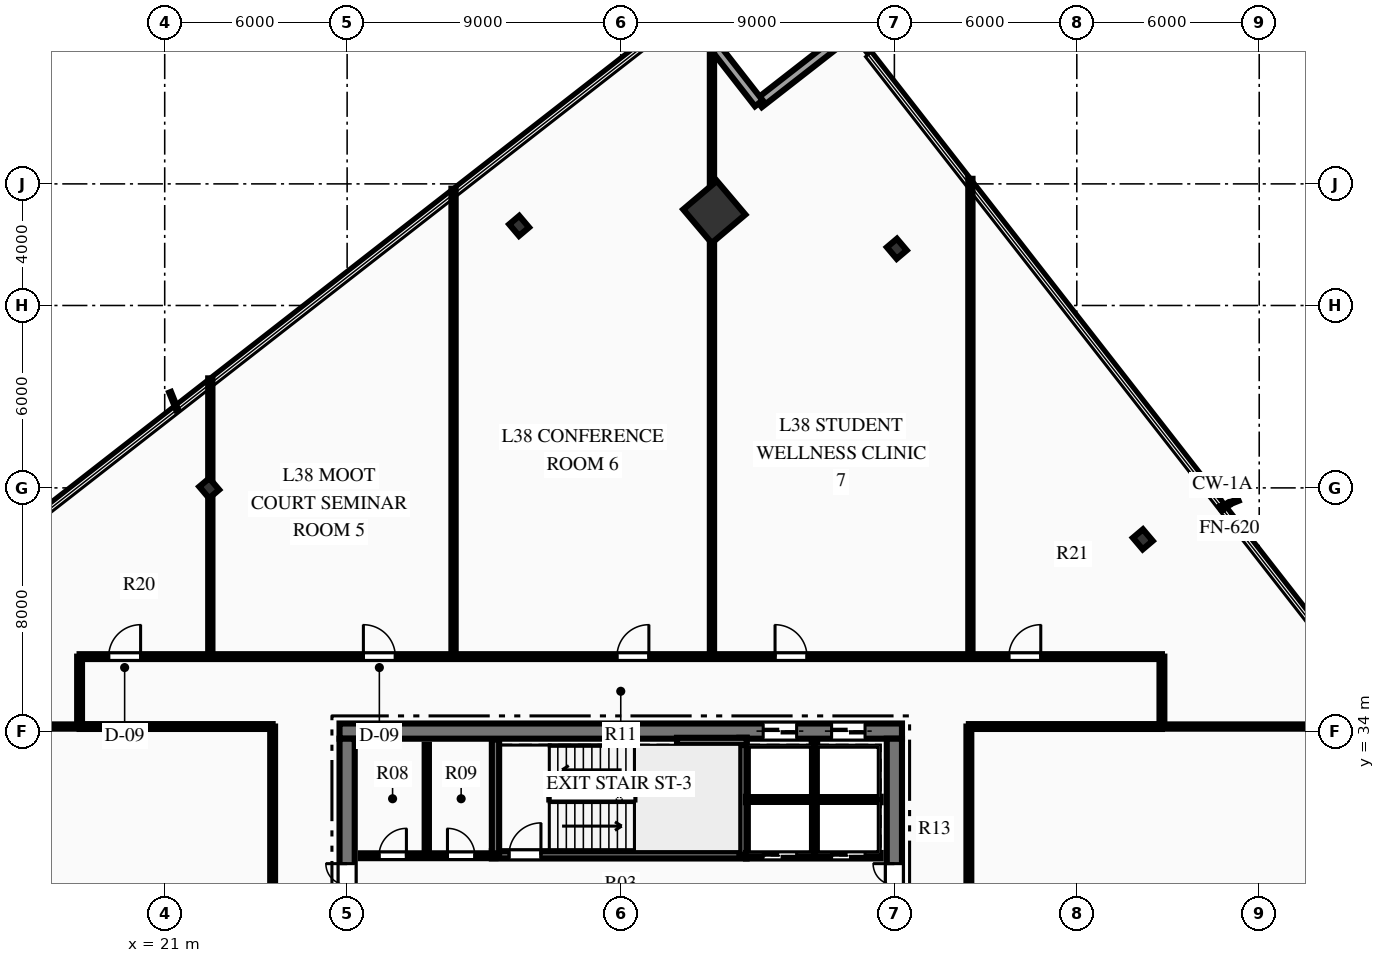
"""IFC4 building model, lengths in metres.
Left out: names, types, materials, properties, quantities, classifications, styles, units other than length and angle.
Written with IfcOpenShell. Run it as: python <this file> out.ifc"""

import sys

from ifc_helpers import new_model, si_unit, direction, frame, frame_2d, origin, origin_2d, place, context, subcontext, project, spatial, rectangle, hollow_rectangle, i_section, extrude, element, fill, save


model = new_model("IFC4")
c1 = context("Model", 3, precision=1e-05, world=origin(), true_north=direction((0.0, 1.0)))
c2 = subcontext(c1, "Body", "Model", "MODEL_VIEW")
j1 = project(units=[si_unit("LENGTHUNIT", "METRE"), si_unit("PLANEANGLEUNIT", "RADIAN")], contexts=[c1])
p1 = place(None, origin())
s1 = spatial("IfcSite", under=j1, at=p1, CompositionType="ELEMENT")
p2 = place(p1, origin())
s2 = spatial("IfcBuilding", under=s1, at=p2, CompositionType="ELEMENT")
p3 = place(p2, frame((0.0, 0.0, 155.7)))
s3 = spatial("IfcBuildingStorey", under=s2, at=p3, CompositionType="ELEMENT", Elevation=155.7)
p4 = place(p3, frame((26.75, 34.0, 0.0), z_axis=(0.0, 0.0, 1.0), x_axis=(1.0, 0.0, 0.0)))
e1 = element("IfcWall", 1, at=p4, inside=s3, PredefinedType="SHEAR", context=c2, shape_type="SweptSolid", body=[
    extrude(rectangle(XDim=18.5, YDim=0.5, at=frame_2d((9.25, 0.0))), origin(), (0.0, 0.0, 1.0), 3.75),
])
p5 = place(p4, frame((13.935, 0.0, 0.0)))
e2 = element("IfcOpeningElement", 2, at=p5, cuts=e1, PredefinedType="OPENING", context=c2, shape_type="SweptSolid", body=[
    extrude(rectangle(XDim=1.1, YDim=2.15, at=frame_2d((0.55, 1.075))), frame((0.0, 0.26, 0.0), z_axis=(0.0, -1.0, 0.0), x_axis=(1.0, 0.0, 0.0)), (0.0, 0.0, 1.0), 0.52),
])
p6 = place(p4, frame((16.185, 0.0, 0.0)))
e3 = element("IfcOpeningElement", 3, at=p6, cuts=e1, PredefinedType="OPENING", context=c2, shape_type="SweptSolid", body=[
    extrude(rectangle(XDim=1.1, YDim=2.15, at=frame_2d((0.55, 1.075))), frame((0.0, 0.26, 0.0), z_axis=(0.0, -1.0, 0.0), x_axis=(1.0, 0.0, 0.0)), (0.0, 0.0, 1.0), 0.52),
])
p7 = place(p3, frame((27.0, 18.25, 0.0), z_axis=(0.0, 0.0, 1.0), x_axis=(0.0, 1.0, 0.0)))
e4 = element("IfcWall", 4, at=p7, inside=s3, PredefinedType="SHEAR", context=c2, shape_type="SweptSolid", body=[
    extrude(rectangle(XDim=15.5, YDim=0.5, at=frame_2d((7.75, 0.0))), origin(), (0.0, 0.0, 1.0), 3.75),
])
p8 = place(p7, frame((9.99, 0.0, 0.0)))
e5 = element("IfcOpeningElement", 5, at=p8, cuts=e4, PredefinedType="OPENING", context=c2, shape_type="SweptSolid", body=[
    extrude(rectangle(XDim=1.4, YDim=2.2, at=frame_2d((0.7, 1.1))), frame((0.0, 0.26, 0.0), z_axis=(0.0, -1.0, 0.0), x_axis=(1.0, 0.0, 0.0)), (0.0, 0.0, 1.0), 0.52),
])
p9 = place(p3, frame((45.0, 18.25, 0.0), z_axis=(0.0, 0.0, 1.0), x_axis=(0.0, 1.0, 0.0)))
e6 = element("IfcWall", 6, at=p9, inside=s3, PredefinedType="SHEAR", context=c2, shape_type="SweptSolid", body=[
    extrude(rectangle(XDim=15.5, YDim=0.5, at=frame_2d((7.75, 0.0))), origin(), (0.0, 0.0, 1.0), 3.75),
])
p10 = place(p9, frame((9.99, 0.0, 0.0)))
e7 = element("IfcOpeningElement", 7, at=p10, cuts=e6, PredefinedType="OPENING", context=c2, shape_type="SweptSolid", body=[
    extrude(rectangle(XDim=1.4, YDim=2.2, at=frame_2d((0.7, 1.1))), frame((0.0, 0.26, 0.0), z_axis=(0.0, -1.0, 0.0), x_axis=(1.0, 0.0, 0.0)), (0.0, 0.0, 1.0), 0.52),
])
p11 = place(p3, frame((31.76, 29.93, 0.0), z_axis=(0.0, 0.0, 1.0), x_axis=(1.0, 0.0, 0.0)))
e8 = element("IfcWall", 8, at=p11, inside=s3, PredefinedType="SHEAR", context=c2, shape_type="SweptSolid", body=[
    extrude(rectangle(XDim=8.38, YDim=0.24, at=frame_2d((4.19, 0.0))), origin(), (0.0, 0.0, 1.0), 3.75),
])
p12 = place(p11, frame((0.565, 0.0, 0.0)))
e9 = element("IfcOpeningElement", 9, at=p12, cuts=e8, PredefinedType="OPENING", context=c2, shape_type="SweptSolid", body=[
    extrude(rectangle(XDim=1.05, YDim=2.15, at=frame_2d((0.525, 1.075))), frame((0.0, 0.13, 0.0), z_axis=(0.0, -1.0, 0.0), x_axis=(1.0, 0.0, 0.0)), (0.0, 0.0, 1.0), 0.26),
])
p13 = place(p3, frame((31.88, 29.93, 0.0), z_axis=(0.0, 0.0, 1.0), x_axis=(0.0, 1.0, 0.0)))
e10 = element("IfcWall", 10, at=p13, inside=s3, PredefinedType="SHEAR", context=c2, shape_type="SweptSolid", body=[
    extrude(rectangle(XDim=3.79, YDim=0.24, at=frame_2d((1.895, 0.0))), origin(), (0.0, 0.0, 1.0), 3.75),
])
p14 = place(p3, frame((40.02, 29.93, 0.0), z_axis=(0.0, 0.0, 1.0), x_axis=(0.0, 1.0, 0.0)))
e11 = element("IfcWall", 11, at=p14, inside=s3, PredefinedType="SHEAR", context=c2, shape_type="SweptSolid", body=[
    extrude(rectangle(XDim=3.85, YDim=0.24, at=frame_2d((1.925, 0.0))), origin(), (0.0, 0.0, 1.0), 3.75),
])
p15 = place(p3, frame((37.85, 33.66, 0.0), z_axis=(0.0, 0.0, 1.0), x_axis=(1.0, 0.0, 0.0)))
e12 = element("IfcWall", 12, at=p15, inside=s3, PredefinedType="SHEAR", context=c2, shape_type="SweptSolid", body=[
    extrude(rectangle(XDim=2.29, YDim=0.24, at=frame_2d((1.145, 0.0))), origin(), (0.0, 0.0, 1.0), 3.75),
])
p16 = place(p3, frame((39.077, 51.075, 0.0), z_axis=(0.0, 0.0, 1.0), x_axis=(0.763232469783, 0.646123979643, 0.0)))
e13 = element("IfcColumn", 13, at=p16, inside=s3, PredefinedType="COLUMN", context=c2, shape_type="SweptSolid", body=[
    extrude(hollow_rectangle(XDim=1.45, YDim=1.45, WallThickness=0.07, at=origin_2d()), origin(), (0.0, 0.0, 1.0), 3.75),
])
for number, where, z_axis, x_axis in (
    (14, (53.171, 40.307, 0.0), (0.0, 0.0, 1.0), (0.763, 0.646, 0.0)),
    (15, (45.08, 49.865, 0.0), (0.0, 0.0, 1.0), (0.763, 0.646, 0.0)),
    (16, (32.657, 50.619, 0.0), (0.0, 0.0, 1.0), (0.763, 0.646, 0.0)),
    (17, (22.464, 41.99, 0.0), (0.0, 0.0, 1.0), (0.763, 0.646, 0.0)),
):
    element("IfcColumn", number, at=place(p3, frame(where, z_axis=z_axis, x_axis=x_axis)), inside=s3, PredefinedType="COLUMN", context=c2, shape_type="SweptSolid", body=[
        extrude(i_section(OverallWidth=0.432, OverallDepth=0.498, WebThickness=0.056, FlangeThickness=0.089, at=origin_2d()), origin(), (0.0, 0.0, 1.0), 3.75),
    ])
p17 = place(p3, frame((43.695, 57.111, 0.0), z_axis=(0.0, 0.0, 1.0), x_axis=(0.614954214778, -0.788562815333, 0.0)))
e18 = element("IfcWall", 18, at=p17, inside=s3, PredefinedType="STANDARD", context=c2, shape_type="SweptSolid", body=[
    extrude(rectangle(XDim=0.9, YDim=0.32, at=frame_2d((0.45, 0.0))), origin(), (0.0, 0.0, 1.0), 3.46),
])
p18 = place(p3, frame((40.541, 54.651, 0.0), z_axis=(0.0, 0.0, 1.0), x_axis=(0.788526577195, 0.615000680534, 0.0)))
e19 = element("IfcWall", 19, at=p18, inside=s3, PredefinedType="STANDARD", context=c2, shape_type="SweptSolid", body=[
    extrude(rectangle(XDim=4.0, YDim=0.32, at=frame_2d((2.0, 0.0))), origin(), (0.0, 0.0, 1.0), 3.46),
])
p19 = place(p3, frame((38.081, 57.805, 0.0), z_axis=(0.0, 0.0, 1.0), x_axis=(0.614971082366, -0.788549660994, 0.0)))
e20 = element("IfcWall", 20, at=p19, inside=s3, PredefinedType="STANDARD", context=c2, shape_type="SweptSolid", body=[
    extrude(rectangle(XDim=4.0, YDim=0.32, at=frame_2d((2.0, 0.0))), origin(), (0.0, 0.0, 1.0), 3.46),
])
p20 = place(p3, frame((27.45, 29.9, 0.0), z_axis=(0.0, 0.0, 1.0), x_axis=(1.0, 0.0, 0.0)))
e21 = element("IfcWall", 21, at=p20, inside=s3, PredefinedType="PARTITIONING", context=c2, shape_type="SweptSolid", body=[
    extrude(rectangle(XDim=4.43, YDim=0.16, at=frame_2d((2.215, 0.0))), origin(), (0.0, 0.0, 1.0), 3.46),
])
p21 = place(p20, frame((0.6, 0.0, 0.0)))
e22 = element("IfcOpeningElement", 22, at=p21, cuts=e21, PredefinedType="OPENING", context=c2, shape_type="SweptSolid", body=[
    extrude(rectangle(XDim=0.9, YDim=2.15, at=frame_2d((0.45, 1.075))), frame((0.0, 0.09, 0.0), z_axis=(0.0, -1.0, 0.0), x_axis=(1.0, 0.0, 0.0)), (0.0, 0.0, 1.0), 0.18),
])
p22 = place(p20, frame((2.85, 0.0, 0.0)))
e23 = element("IfcOpeningElement", 23, at=p22, cuts=e21, PredefinedType="OPENING", context=c2, shape_type="SweptSolid", body=[
    extrude(rectangle(XDim=0.9, YDim=2.15, at=frame_2d((0.45, 1.075))), frame((0.0, 0.09, 0.0), z_axis=(0.0, -1.0, 0.0), x_axis=(1.0, 0.0, 0.0)), (0.0, 0.0, 1.0), 0.18),
])
p23 = place(p3, frame((29.62, 29.95, 0.0), z_axis=(0.0, 0.0, 1.0), x_axis=(0.0, 1.0, 0.0)))
e24 = element("IfcWall", 24, at=p23, inside=s3, PredefinedType="PARTITIONING", context=c2, shape_type="SweptSolid", body=[
    extrude(rectangle(XDim=3.6, YDim=0.14, at=frame_2d((1.8, 0.0))), origin(), (0.0, 0.0, 1.0), 3.46),
])
p24 = place(p3, frame((40.12, 29.9, 0.0), z_axis=(0.0, 0.0, 1.0), x_axis=(1.0, 0.0, 0.0)))
e25 = element("IfcWall", 25, at=p24, inside=s3, PredefinedType="PARTITIONING", context=c2, shape_type="SweptSolid", body=[
    extrude(rectangle(XDim=4.43, YDim=0.18, at=frame_2d((2.215, 0.0))), origin(), (0.0, 0.0, 1.0), 3.46),
])
p25 = place(p24, frame((0.565, 0.0, 0.0)))
e26 = element("IfcOpeningElement", 26, at=p25, cuts=e25, PredefinedType="OPENING", context=c2, shape_type="SweptSolid", body=[
    extrude(rectangle(XDim=1.1, YDim=2.15, at=frame_2d((0.55, 1.075))), frame((0.0, 0.1, 0.0), z_axis=(0.0, -1.0, 0.0), x_axis=(1.0, 0.0, 0.0)), (0.0, 0.0, 1.0), 0.2),
])
p26 = place(p24, frame((2.815, 0.0, 0.0)))
e27 = element("IfcOpeningElement", 27, at=p26, cuts=e25, PredefinedType="OPENING", context=c2, shape_type="SweptSolid", body=[
    extrude(rectangle(XDim=1.1, YDim=2.15, at=frame_2d((0.55, 1.075))), frame((0.0, 0.1, 0.0), z_axis=(0.0, -1.0, 0.0), x_axis=(1.0, 0.0, 0.0)), (0.0, 0.0, 1.0), 0.2),
])
p27 = place(p3, frame((40.12, 31.75, 0.0), z_axis=(0.0, 0.0, 1.0), x_axis=(1.0, 0.0, 0.0)))
e28 = element("IfcWall", 28, at=p27, inside=s3, PredefinedType="PARTITIONING", context=c2, shape_type="SweptSolid", body=[
    extrude(rectangle(XDim=4.43, YDim=0.18, at=frame_2d((2.215, 0.0))), origin(), (0.0, 0.0, 1.0), 3.46),
])
p28 = place(p3, frame((42.37, 29.9, 0.0), z_axis=(0.0, 0.0, 1.0), x_axis=(0.0, 1.0, 0.0)))
e29 = element("IfcWall", 29, at=p28, inside=s3, PredefinedType="PARTITIONING", context=c2, shape_type="SweptSolid", body=[
    extrude(rectangle(XDim=3.75, YDim=0.18, at=frame_2d((1.875, 0.0))), origin(), (0.0, 0.0, 1.0), 3.46),
])
p29 = place(p3, frame((18.2, 36.45, 0.0), z_axis=(0.0, 0.0, 1.0), x_axis=(1.0, 0.0, 0.0)))
e30 = element("IfcWall", 30, at=p29, inside=s3, PredefinedType="PARTITIONING", context=c2, shape_type="SweptSolid", body=[
    extrude(rectangle(XDim=35.6, YDim=0.16, at=frame_2d((17.8, 0.0))), origin(), (0.0, 0.0, 1.0), 3.46),
])
p30 = place(p29, frame((0.957, 0.0, 0.0)))
e31 = element("IfcOpeningElement", 31, at=p30, cuts=e30, PredefinedType="OPENING", context=c2, shape_type="SweptSolid", body=[
    extrude(rectangle(XDim=1.05, YDim=2.15, at=frame_2d((0.525, 1.075))), frame((0.0, 0.09, 0.0), z_axis=(0.0, -1.0, 0.0), x_axis=(1.0, 0.0, 0.0)), (0.0, 0.0, 1.0), 0.18),
])
p31 = place(p29, frame((9.335, 0.0, 0.0)))
e32 = element("IfcOpeningElement", 32, at=p31, cuts=e30, PredefinedType="OPENING", context=c2, shape_type="SweptSolid", body=[
    extrude(rectangle(XDim=1.05, YDim=2.15, at=frame_2d((0.525, 1.075))), frame((0.0, 0.09, 0.0), z_axis=(0.0, -1.0, 0.0), x_axis=(1.0, 0.0, 0.0)), (0.0, 0.0, 1.0), 0.18),
])
p32 = place(p29, frame((17.675, 0.0, 0.0)))
e33 = element("IfcOpeningElement", 33, at=p32, cuts=e30, PredefinedType="OPENING", context=c2, shape_type="SweptSolid", body=[
    extrude(rectangle(XDim=1.05, YDim=2.15, at=frame_2d((0.525, 1.075))), frame((0.0, 0.09, 0.0), z_axis=(0.0, -1.0, 0.0), x_axis=(1.0, 0.0, 0.0)), (0.0, 0.0, 1.0), 0.18),
])
p33 = place(p29, frame((22.875, 0.0, 0.0)))
e34 = element("IfcOpeningElement", 34, at=p33, cuts=e30, PredefinedType="OPENING", context=c2, shape_type="SweptSolid", body=[
    extrude(rectangle(XDim=1.05, YDim=2.15, at=frame_2d((0.525, 1.075))), frame((0.0, 0.09, 0.0), z_axis=(0.0, -1.0, 0.0), x_axis=(1.0, 0.0, 0.0)), (0.0, 0.0, 1.0), 0.18),
])
p34 = place(p29, frame((30.565, 0.0, 0.0)))
e35 = element("IfcOpeningElement", 35, at=p34, cuts=e30, PredefinedType="OPENING", context=c2, shape_type="SweptSolid", body=[
    extrude(rectangle(XDim=1.05, YDim=2.15, at=frame_2d((0.525, 1.075))), frame((0.0, 0.09, 0.0), z_axis=(0.0, -1.0, 0.0), x_axis=(1.0, 0.0, 0.0)), (0.0, 0.0, 1.0), 0.18),
])
for number, where, z_axis, x_axis in (
    (36, (18.2, 34.15, 0.0), (0.0, 0.0, 1.0), (1.0, 0.0, 0.0)),
    (37, (47.45, 34.15, 0.0), (0.0, 0.0, 1.0), (1.0, 0.0, 0.0)),
):
    element("IfcWall", number, at=place(p3, frame(where, z_axis=z_axis, x_axis=x_axis)), inside=s3, PredefinedType="PARTITIONING", context=c2, shape_type="SweptSolid", body=[
        extrude(rectangle(XDim=6.35, YDim=0.16, at=frame_2d((3.175, 0.0))), origin(), (0.0, 0.0, 1.0), 3.46),
    ])
p35 = place(p3, frame((24.55, 17.85, 0.0), z_axis=(0.0, 0.0, 1.0), x_axis=(0.0, 1.0, 0.0)))
e38 = element("IfcWall", 38, at=p35, inside=s3, PredefinedType="PARTITIONING", context=c2, shape_type="SweptSolid", body=[
    extrude(rectangle(XDim=16.3, YDim=0.16, at=frame_2d((8.15, 0.0))), origin(), (0.0, 0.0, 1.0), 3.46),
])
p36 = place(p35, frame((2.775, 0.0, 0.0)))
e39 = element("IfcOpeningElement", 39, at=p36, cuts=e38, PredefinedType="OPENING", context=c2, shape_type="SweptSolid", body=[
    extrude(rectangle(XDim=0.95, YDim=2.15, at=frame_2d((0.475, 1.075))), frame((0.0, 0.09, 0.0), z_axis=(0.0, -1.0, 0.0), x_axis=(1.0, 0.0, 0.0)), (0.0, 0.0, 1.0), 0.18),
])
p37 = place(p35, frame((8.729, 0.0, 0.0)))
e40 = element("IfcOpeningElement", 40, at=p37, cuts=e38, PredefinedType="OPENING", context=c2, shape_type="SweptSolid", body=[
    extrude(rectangle(XDim=1.05, YDim=2.15, at=frame_2d((0.525, 1.075))), frame((0.0, 0.09, 0.0), z_axis=(0.0, -1.0, 0.0), x_axis=(1.0, 0.0, 0.0)), (0.0, 0.0, 1.0), 0.18),
])
p38 = place(p3, frame((47.45, 27.25, 0.0), z_axis=(0.0, 0.0, 1.0), x_axis=(0.0, 1.0, 0.0)))
e41 = element("IfcWall", 41, at=p38, inside=s3, PredefinedType="PARTITIONING", context=c2, shape_type="SweptSolid", body=[
    extrude(rectangle(XDim=6.9, YDim=0.16, at=frame_2d((3.45, 0.0))), origin(), (0.0, 0.0, 1.0), 3.46),
])
for number, where, z_axis, x_axis in (
    (42, (18.2, 34.15, 0.0), (0.0, 0.0, 1.0), (0.0, 1.0, 0.0)),
    (43, (53.8, 34.15, 0.0), (0.0, 0.0, 1.0), (0.0, 1.0, 0.0)),
):
    element("IfcWall", number, at=place(p3, frame(where, z_axis=z_axis, x_axis=x_axis)), inside=s3, PredefinedType="PARTITIONING", context=c2, shape_type="SweptSolid", body=[
        extrude(rectangle(XDim=2.3, YDim=0.16, at=frame_2d((1.15, 0.0))), origin(), (0.0, 0.0, 1.0), 3.46),
    ])
p39 = place(p3, frame((7.814, 34.15, 0.0), z_axis=(0.0, 0.0, 1.0), x_axis=(1.0, 0.0, 0.0)))
e44 = element("IfcWall", 44, at=p39, inside=s3, PredefinedType="PARTITIONING", context=c2, shape_type="SweptSolid", body=[
    extrude(rectangle(XDim=10.385, YDim=0.14, at=frame_2d((5.193, 0.0))), origin(), (0.0, 0.0, 1.0), 3.46),
])
p40 = place(p3, frame((53.8, 34.15, 0.0), z_axis=(0.0, 0.0, 1.0), x_axis=(1.0, 0.0, 0.0)))
e45 = element("IfcWall", 45, at=p40, inside=s3, PredefinedType="PARTITIONING", context=c2, shape_type="SweptSolid", body=[
    extrude(rectangle(XDim=7.751, YDim=0.14, at=frame_2d((3.875, 0.0))), origin(), (0.0, 0.0, 1.0), 3.46),
])
p41 = place(p3, frame((22.5, 36.45, 0.0), z_axis=(0.0, 0.0, 1.0), x_axis=(0.0, 1.0, 0.0)))
e46 = element("IfcWall", 46, at=p41, inside=s3, PredefinedType="PARTITIONING", context=c2, shape_type="SweptSolid", body=[
    extrude(rectangle(XDim=9.153, YDim=0.14, at=frame_2d((4.577, 0.0))), origin(), (0.0, 0.0, 1.0), 3.46),
])
p42 = place(p3, frame((30.5, 36.45, 0.0), z_axis=(0.0, 0.0, 1.0), x_axis=(0.0, 1.0, 0.0)))
e47 = element("IfcWall", 47, at=p42, inside=s3, PredefinedType="PARTITIONING", context=c2, shape_type="SweptSolid", body=[
    extrude(rectangle(XDim=15.392, YDim=0.14, at=frame_2d((7.696, 0.0))), origin(), (0.0, 0.0, 1.0), 3.46),
])
p43 = place(p3, frame((39.0, 36.45, 0.0), z_axis=(0.0, 0.0, 1.0), x_axis=(0.0, 1.0, 0.0)))
e48 = element("IfcWall", 48, at=p43, inside=s3, PredefinedType="PARTITIONING", context=c2, shape_type="SweptSolid", body=[
    extrude(rectangle(XDim=20.111, YDim=0.14, at=frame_2d((10.056, 0.0))), origin(), (0.0, 0.0, 1.0), 2.839),
])
p44 = place(p3, frame((47.5, 36.45, 0.0), z_axis=(0.0, 0.0, 1.0), x_axis=(0.0, 1.0, 0.0)))
e49 = element("IfcWall", 49, at=p44, inside=s3, PredefinedType="PARTITIONING", context=c2, shape_type="SweptSolid", body=[
    extrude(rectangle(XDim=15.717, YDim=0.14, at=frame_2d((7.858, 0.0))), origin(), (0.0, 0.0, 1.0), 3.46),
])
p45 = place(p21, origin())
e50 = element("IfcDoor", 50, at=p45, inside=s3, OperationType="SINGLE_SWING_RIGHT", PredefinedType="DOOR", context=c2, shape_type="SweptSolid", body=[
    extrude(rectangle(XDim=0.9, YDim=2.15, at=frame_2d((0.45, 1.075))), frame((0.0, 0.025, 0.0), z_axis=(0.0, -1.0, 0.0), x_axis=(1.0, 0.0, 0.0)), (0.0, 0.0, 1.0), 0.05),
])
fill(e22, e50)
p46 = place(p22, origin())
e51 = element("IfcDoor", 51, at=p46, inside=s3, OperationType="SINGLE_SWING_LEFT", PredefinedType="DOOR", context=c2, shape_type="SweptSolid", body=[
    extrude(rectangle(XDim=0.9, YDim=2.15, at=frame_2d((0.45, 1.075))), frame((0.0, 0.025, 0.0), z_axis=(0.0, -1.0, 0.0), x_axis=(1.0, 0.0, 0.0)), (0.0, 0.0, 1.0), 0.05),
])
fill(e23, e51)
p47 = place(p12, origin())
e52 = element("IfcDoor", 52, at=p47, inside=s3, OperationType="SINGLE_SWING_RIGHT", PredefinedType="DOOR", context=c2, shape_type="SweptSolid", body=[
    extrude(rectangle(XDim=1.05, YDim=2.15, at=frame_2d((0.525, 1.075))), frame((0.0, 0.025, 0.0), z_axis=(0.0, -1.0, 0.0), x_axis=(1.0, 0.0, 0.0)), (0.0, 0.0, 1.0), 0.05),
])
fill(e9, e52)
p48 = place(p8, origin())
e53 = element("IfcDoor", 53, at=p48, inside=s3, OperationType="DOUBLE_DOOR_SINGLE_SWING", PredefinedType="DOOR", context=c2, shape_type="SweptSolid", body=[
    extrude(rectangle(XDim=1.4, YDim=2.2, at=frame_2d((0.7, 1.1))), frame((0.0, 0.025, 0.0), z_axis=(0.0, -1.0, 0.0), x_axis=(1.0, 0.0, 0.0)), (0.0, 0.0, 1.0), 0.05),
])
fill(e5, e53)
p49 = place(p10, origin())
e54 = element("IfcDoor", 54, at=p49, inside=s3, OperationType="DOUBLE_DOOR_SINGLE_SWING", PredefinedType="DOOR", context=c2, shape_type="SweptSolid", body=[
    extrude(rectangle(XDim=1.4, YDim=2.2, at=frame_2d((0.7, 1.1))), frame((0.0, 0.025, 0.0), z_axis=(0.0, -1.0, 0.0), x_axis=(1.0, 0.0, 0.0)), (0.0, 0.0, 1.0), 0.05),
])
fill(e7, e54)
p50 = place(p30, origin())
e55 = element("IfcDoor", 55, at=p50, inside=s3, OperationType="SINGLE_SWING_RIGHT", PredefinedType="DOOR", context=c2, shape_type="SweptSolid", body=[
    extrude(rectangle(XDim=1.05, YDim=2.15, at=frame_2d((0.525, 1.075))), frame((0.0, 0.025, 0.0), z_axis=(0.0, -1.0, 0.0), x_axis=(1.0, 0.0, 0.0)), (0.0, 0.0, 1.0), 0.05),
])
fill(e31, e55)
p51 = place(p31, origin())
e56 = element("IfcDoor", 56, at=p51, inside=s3, OperationType="SINGLE_SWING_LEFT", PredefinedType="DOOR", context=c2, shape_type="SweptSolid", body=[
    extrude(rectangle(XDim=1.05, YDim=2.15, at=frame_2d((0.525, 1.075))), frame((0.0, 0.025, 0.0), z_axis=(0.0, -1.0, 0.0), x_axis=(1.0, 0.0, 0.0)), (0.0, 0.0, 1.0), 0.05),
])
fill(e32, e56)
p52 = place(p32, origin())
e57 = element("IfcDoor", 57, at=p52, inside=s3, OperationType="SINGLE_SWING_RIGHT", PredefinedType="DOOR", context=c2, shape_type="SweptSolid", body=[
    extrude(rectangle(XDim=1.05, YDim=2.15, at=frame_2d((0.525, 1.075))), frame((0.0, 0.025, 0.0), z_axis=(0.0, -1.0, 0.0), x_axis=(1.0, 0.0, 0.0)), (0.0, 0.0, 1.0), 0.05),
])
fill(e33, e57)
p53 = place(p33, origin())
e58 = element("IfcDoor", 58, at=p53, inside=s3, OperationType="SINGLE_SWING_LEFT", PredefinedType="DOOR", context=c2, shape_type="SweptSolid", body=[
    extrude(rectangle(XDim=1.05, YDim=2.15, at=frame_2d((0.525, 1.075))), frame((0.0, 0.025, 0.0), z_axis=(0.0, -1.0, 0.0), x_axis=(1.0, 0.0, 0.0)), (0.0, 0.0, 1.0), 0.05),
])
fill(e34, e58)
p54 = place(p34, origin())
e59 = element("IfcDoor", 59, at=p54, inside=s3, OperationType="SINGLE_SWING_RIGHT", PredefinedType="DOOR", context=c2, shape_type="SweptSolid", body=[
    extrude(rectangle(XDim=1.05, YDim=2.15, at=frame_2d((0.525, 1.075))), frame((0.0, 0.025, 0.0), z_axis=(0.0, -1.0, 0.0), x_axis=(1.0, 0.0, 0.0)), (0.0, 0.0, 1.0), 0.05),
])
fill(e35, e59)
p55 = place(p25, origin())
e60 = element("IfcDoor", 60, at=p55, inside=s3, OperationType="SLIDING_TO_LEFT", PredefinedType="DOOR", context=c2, shape_type="SweptSolid", body=[
    extrude(rectangle(XDim=1.1, YDim=2.15, at=frame_2d((0.55, 1.075))), frame((0.0, 0.025, 0.0), z_axis=(0.0, -1.0, 0.0), x_axis=(1.0, 0.0, 0.0)), (0.0, 0.0, 1.0), 0.05),
])
fill(e26, e60)
p56 = place(p26, origin())
e61 = element("IfcDoor", 61, at=p56, inside=s3, OperationType="SLIDING_TO_LEFT", PredefinedType="DOOR", context=c2, shape_type="SweptSolid", body=[
    extrude(rectangle(XDim=1.1, YDim=2.15, at=frame_2d((0.55, 1.075))), frame((0.0, 0.025, 0.0), z_axis=(0.0, -1.0, 0.0), x_axis=(1.0, 0.0, 0.0)), (0.0, 0.0, 1.0), 0.05),
])
fill(e27, e61)
p57 = place(p5, origin())
e62 = element("IfcDoor", 62, at=p57, inside=s3, OperationType="SLIDING_TO_LEFT", PredefinedType="DOOR", context=c2, shape_type="SweptSolid", body=[
    extrude(rectangle(XDim=1.1, YDim=2.15, at=frame_2d((0.55, 1.075))), frame((0.0, 0.025, 0.0), z_axis=(0.0, -1.0, 0.0), x_axis=(1.0, 0.0, 0.0)), (0.0, 0.0, 1.0), 0.05),
])
fill(e2, e62)
p58 = place(p6, origin())
e63 = element("IfcDoor", 63, at=p58, inside=s3, OperationType="SLIDING_TO_LEFT", PredefinedType="DOOR", context=c2, shape_type="SweptSolid", body=[
    extrude(rectangle(XDim=1.1, YDim=2.15, at=frame_2d((0.55, 1.075))), frame((0.0, 0.025, 0.0), z_axis=(0.0, -1.0, 0.0), x_axis=(1.0, 0.0, 0.0)), (0.0, 0.0, 1.0), 0.05),
])
fill(e3, e63)
save(model, sys.argv[1])
